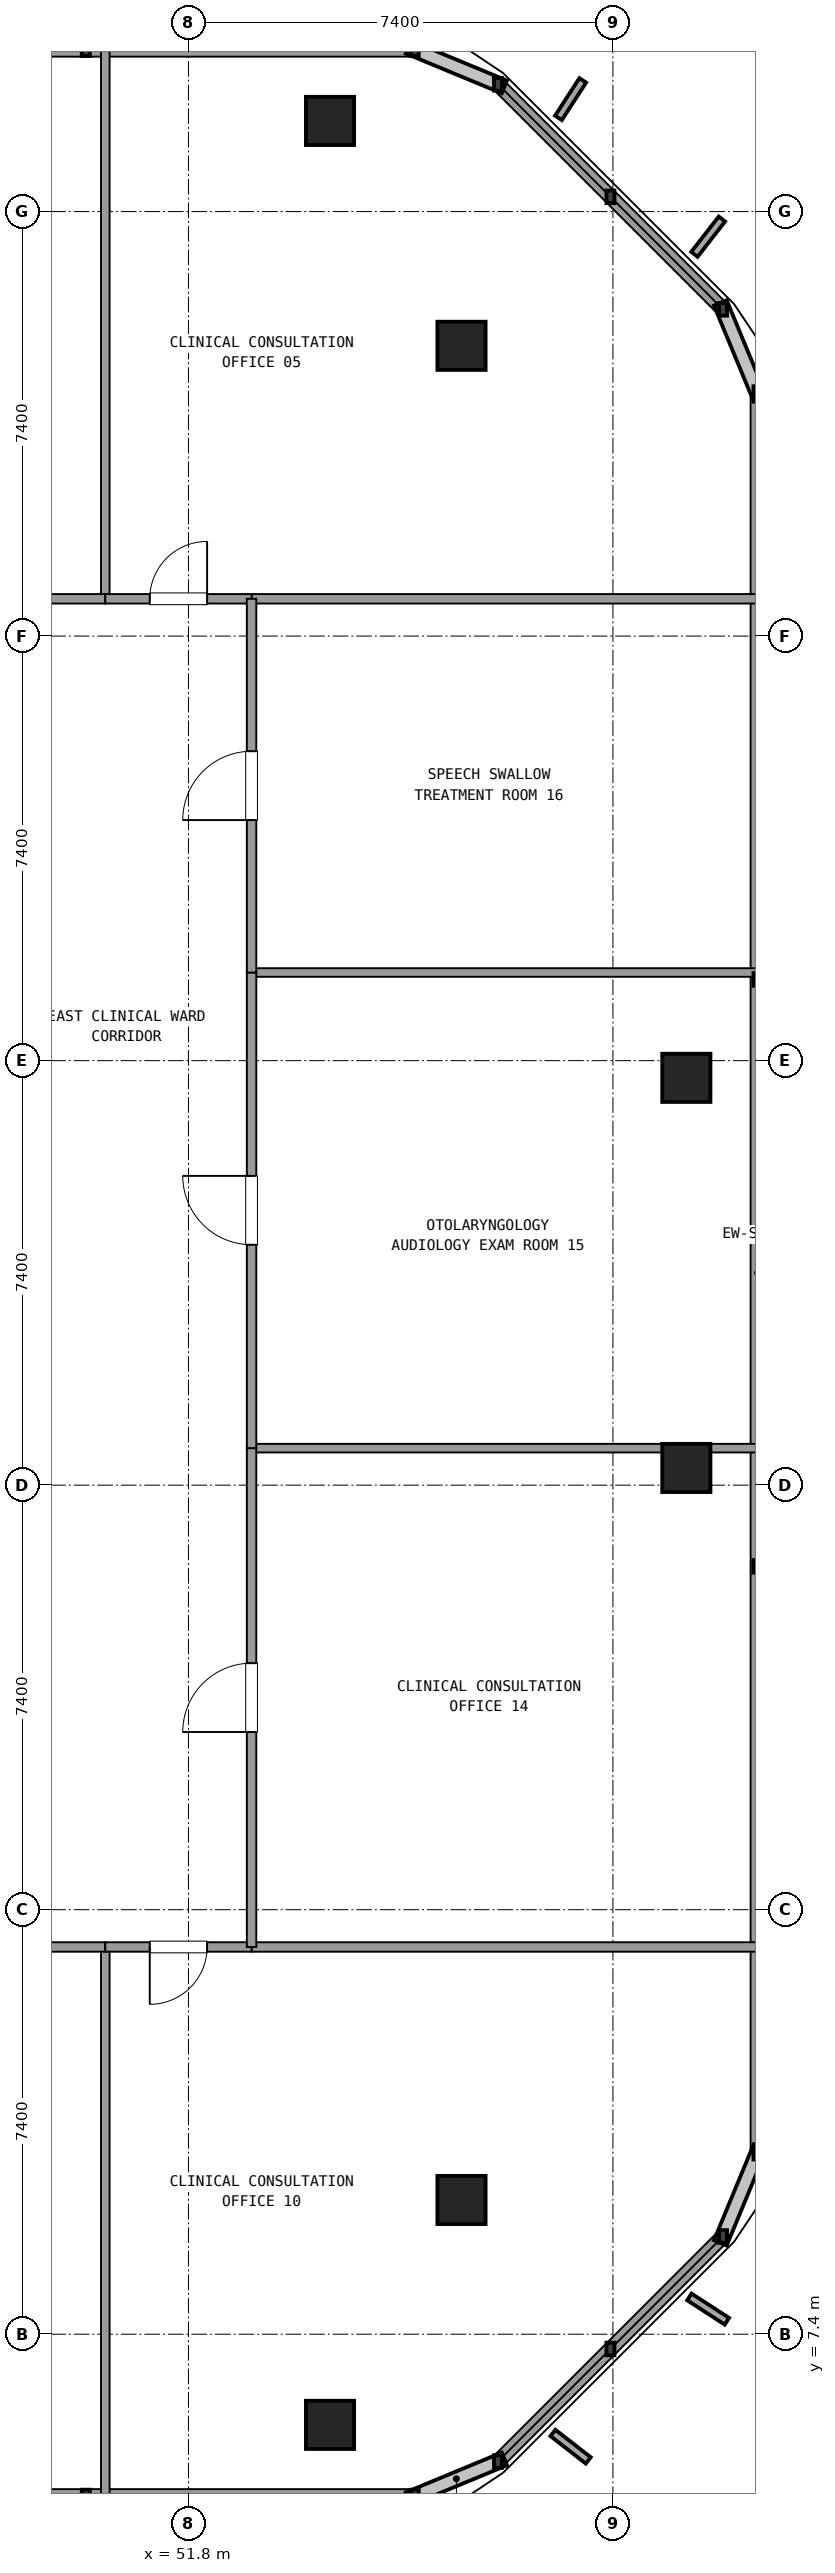
"""IFC4 building model, lengths in metres.
Left out: names, types, materials, properties, quantities, classifications, styles, units other than length and angle.
Written with IfcOpenShell. Run it as: python <this file> out.ifc"""

import sys

from ifc_helpers import new_model, si_unit, direction, frame, frame_2d, origin, origin_2d, place, context, subcontext, project, spatial, rectangle, extrude, element, fill, save


model = new_model("IFC4")
c1 = context("Model", 3, precision=1e-05, world=origin(), true_north=direction((0.0, 1.0)))
c2 = subcontext(c1, "Body", "Model", "MODEL_VIEW")
j1 = project(units=[si_unit("LENGTHUNIT", "METRE"), si_unit("PLANEANGLEUNIT", "RADIAN")], contexts=[c1])
p1 = place(None, origin())
s1 = spatial("IfcSite", under=j1, at=p1, CompositionType="ELEMENT")
p2 = place(p1, origin())
s2 = spatial("IfcBuilding", under=s1, at=p2, CompositionType="ELEMENT")
p3 = place(p2, frame((0.0, 0.0, 253.62)))
s3 = spatial("IfcBuildingStorey", under=s2, at=p3, CompositionType="ELEMENT", Elevation=253.62)
for number, where, z_axis, x_axis in (
    (1, (54.268, 5.82, 0.0), (0.0, 0.0, 1.0), (1.0, 0.0, 0.0)),
    (2, (56.56, 9.74, 0.0), (0.0, 0.0, 1.0), (1.0, 0.0, 0.0)),
    (3, (60.48, 22.5, 0.0), (0.0, 0.0, 1.0), (1.0, 0.0, 0.0)),
    (4, (60.48, 29.3, 0.0), (0.0, 0.0, 1.0), (1.0, 0.0, 0.0)),
    (5, (56.56, 42.06, 0.0), (0.0, 0.0, 1.0), (1.0, 0.0, 0.0)),
    (6, (54.268, 45.98, 0.0), (0.0, 0.0, 1.0), (1.0, 0.0, 0.0)),
):
    element("IfcColumn", number, at=place(p3, frame(where, z_axis=z_axis, x_axis=x_axis)), inside=s3, PredefinedType="COLUMN", context=c2, shape_type="SweptSolid", body=[
        extrude(rectangle(XDim=0.84, YDim=0.84, at=origin_2d()), origin(), (0.0, 0.0, 1.0), 3.6),
    ])
p4 = place(p3, frame((38.539, 4.58, 0.0), z_axis=(0.0, 0.0, 1.0), x_axis=(1.0, 0.0, 0.0)))
e7 = element("IfcWall", 7, at=p4, inside=s3, PredefinedType="SOLIDWALL", context=c2, shape_type="SweptSolid", body=[
    extrude(rectangle(XDim=17.206, YDim=0.24, at=frame_2d((8.603, 0.0))), origin(), (0.0, 0.0, 1.0), 0.85),
])
p5 = place(p3, frame((57.196, 5.181, 0.0), z_axis=(0.0, 0.0, 1.0), x_axis=(0.707084777957, 0.707128783731, 0.0)))
e8 = element("IfcWall", 8, at=p5, inside=s3, PredefinedType="SOLIDWALL", context=c2, shape_type="SweptSolid", body=[
    extrude(rectangle(XDim=5.548, YDim=0.24, at=frame_2d((2.774, 0.0))), origin(), (0.0, 0.0, 1.0), 0.85),
])
p6 = place(p3, frame((61.72, 10.555, 0.0), z_axis=(0.0, 0.0, 1.0), x_axis=(0.0, 1.0, 0.0)))
e9 = element("IfcWall", 9, at=p6, inside=s3, PredefinedType="SOLIDWALL", context=c2, shape_type="SweptSolid", body=[
    extrude(rectangle(XDim=30.69, YDim=0.24, at=frame_2d((15.345, 0.0))), origin(), (0.0, 0.0, 1.0), 0.85),
])
p7 = place(p3, frame((61.119, 42.696, 0.0), z_axis=(0.0, 0.0, 1.0), x_axis=(-0.707106781187, 0.707106781187, 0.0)))
e10 = element("IfcWall", 10, at=p7, inside=s3, PredefinedType="SOLIDWALL", context=c2, shape_type="SweptSolid", body=[
    extrude(rectangle(XDim=5.548, YDim=0.24, at=frame_2d((2.774, 0.0))), origin(), (0.0, 0.0, 1.0), 0.85),
])
p8 = place(p3, frame((55.745, 47.22, 0.0), z_axis=(0.0, 0.0, 1.0), x_axis=(-1.0, 0.0, 0.0)))
e11 = element("IfcWall", 11, at=p8, inside=s3, PredefinedType="SOLIDWALL", context=c2, shape_type="SweptSolid", body=[
    extrude(rectangle(XDim=17.204, YDim=0.24, at=frame_2d((8.602, 0.0))), origin(), (0.0, 0.0, 1.0), 0.85),
])
for number, where, z_axis, x_axis in (
    (12, (52.9, 37.65, 0.0), (0.0, 0.0, 1.0), (1.0, 0.0, 0.0)),
    (13, (52.9, 14.15, 0.0), (0.0, 0.0, 1.0), (1.0, 0.0, 0.0)),
):
    element("IfcWall", number, at=place(p3, frame(where, z_axis=z_axis, x_axis=x_axis)), inside=s3, PredefinedType="PARTITIONING", context=c2, shape_type="SweptSolid", body=[
        extrude(rectangle(XDim=8.8, YDim=0.165, at=frame_2d((4.4, 0.0))), origin(), (0.0, 0.0, 1.0), 2.61),
    ])
p9 = place(p3, frame((50.35, 37.65, 0.0), z_axis=(0.0, 0.0, 1.0), x_axis=(0.0, 1.0, 0.0)))
e14 = element("IfcWall", 14, at=p9, inside=s3, PredefinedType="PARTITIONING", context=c2, shape_type="SweptSolid", body=[
    extrude(rectangle(XDim=9.55, YDim=0.15, at=frame_2d((4.775, 0.0))), origin(), (0.0, 0.0, 1.0), 2.61),
])
p10 = place(p3, frame((42.194, 37.65, 0.0), z_axis=(0.0, 0.0, 1.0), x_axis=(1.0, 0.0, 0.0)))
e15 = element("IfcWall", 15, at=p10, inside=s3, PredefinedType="PARTITIONING", context=c2, shape_type="SweptSolid", body=[
    extrude(rectangle(XDim=8.156, YDim=0.165, at=frame_2d((4.078, 0.0))), origin(), (0.0, 0.0, 1.0), 2.61),
])
p11 = place(p10, frame((3.478, 0.0, 0.0)))
e16 = element("IfcOpeningElement", 16, at=p11, cuts=e15, PredefinedType="OPENING", context=c2, shape_type="SweptSolid", body=[
    extrude(rectangle(XDim=1.2, YDim=2.15, at=frame_2d((0.6, 1.075))), frame((0.0, 0.093, 0.0), z_axis=(0.0, -1.0, 0.0), x_axis=(1.0, 0.0, 0.0)), (0.0, 0.0, 1.0), 0.185),
])
p12 = place(p3, frame((50.35, 37.65, 0.0), z_axis=(0.0, 0.0, 1.0), x_axis=(1.0, 0.0, 0.0)))
e17 = element("IfcWall", 17, at=p12, inside=s3, PredefinedType="PARTITIONING", context=c2, shape_type="SweptSolid", body=[
    extrude(rectangle(XDim=2.55, YDim=0.165, at=frame_2d((1.275, 0.0))), origin(), (0.0, 0.0, 1.0), 2.61),
])
p13 = place(p12, frame((0.775, 0.0, 0.0)))
e18 = element("IfcOpeningElement", 18, at=p13, cuts=e17, PredefinedType="OPENING", context=c2, shape_type="SweptSolid", body=[
    extrude(rectangle(XDim=1.0, YDim=2.15, at=frame_2d((0.5, 1.075))), frame((0.0, 0.093, 0.0), z_axis=(0.0, -1.0, 0.0), x_axis=(1.0, 0.0, 0.0)), (0.0, 0.0, 1.0), 0.185),
])
p14 = place(p3, frame((50.35, 14.15, 0.0), z_axis=(0.0, 0.0, 1.0), x_axis=(0.0, -1.0, 0.0)))
e19 = element("IfcWall", 19, at=p14, inside=s3, PredefinedType="PARTITIONING", context=c2, shape_type="SweptSolid", body=[
    extrude(rectangle(XDim=9.55, YDim=0.15, at=frame_2d((4.775, 0.0))), origin(), (0.0, 0.0, 1.0), 2.61),
])
p15 = place(p3, frame((39.842, 14.15, 0.0), z_axis=(0.0, 0.0, 1.0), x_axis=(1.0, 0.0, 0.0)))
e20 = element("IfcWall", 20, at=p15, inside=s3, PredefinedType="PARTITIONING", context=c2, shape_type="SweptSolid", body=[
    extrude(rectangle(XDim=10.508, YDim=0.165, at=frame_2d((5.254, 0.0))), origin(), (0.0, 0.0, 1.0), 2.61),
])
p16 = place(p15, frame((4.654, 0.0, 0.0)))
e21 = element("IfcOpeningElement", 21, at=p16, cuts=e20, PredefinedType="OPENING", context=c2, shape_type="SweptSolid", body=[
    extrude(rectangle(XDim=1.2, YDim=2.15, at=frame_2d((0.6, 1.075))), frame((0.0, 0.093, 0.0), z_axis=(0.0, -1.0, 0.0), x_axis=(1.0, 0.0, 0.0)), (0.0, 0.0, 1.0), 0.185),
])
p17 = place(p3, frame((50.35, 14.15, 0.0), z_axis=(0.0, 0.0, 1.0), x_axis=(1.0, 0.0, 0.0)))
e22 = element("IfcWall", 22, at=p17, inside=s3, PredefinedType="PARTITIONING", context=c2, shape_type="SweptSolid", body=[
    extrude(rectangle(XDim=2.55, YDim=0.165, at=frame_2d((1.275, 0.0))), origin(), (0.0, 0.0, 1.0), 2.61),
])
p18 = place(p17, frame((0.775, 0.0, 0.0)))
e23 = element("IfcOpeningElement", 23, at=p18, cuts=e22, PredefinedType="OPENING", context=c2, shape_type="SweptSolid", body=[
    extrude(rectangle(XDim=1.0, YDim=2.15, at=frame_2d((0.5, 1.075))), frame((0.0, 0.093, 0.0), z_axis=(0.0, -1.0, 0.0), x_axis=(1.0, 0.0, 0.0)), (0.0, 0.0, 1.0), 0.185),
])
p19 = place(p3, frame((52.9, 22.845, 0.0), z_axis=(0.0, 0.0, 1.0), x_axis=(1.0, 0.0, 0.0)))
e24 = element("IfcWall", 24, at=p19, inside=s3, PredefinedType="PARTITIONING", context=c2, shape_type="SweptSolid", body=[
    extrude(rectangle(XDim=8.8, YDim=0.15, at=frame_2d((4.4, 0.0))), origin(), (0.0, 0.0, 1.0), 2.61),
])
p20 = place(p3, frame((52.9, 14.15, 0.0), z_axis=(0.0, 0.0, 1.0), x_axis=(0.0, 1.0, 0.0)))
e25 = element("IfcWall", 25, at=p20, inside=s3, PredefinedType="PARTITIONING", context=c2, shape_type="SweptSolid", body=[
    extrude(rectangle(XDim=8.695, YDim=0.165, at=frame_2d((4.348, 0.0))), origin(), (0.0, 0.0, 1.0), 2.61),
])
p21 = place(p20, frame((3.747, 0.0, 0.0)))
e26 = element("IfcOpeningElement", 26, at=p21, cuts=e25, PredefinedType="OPENING", context=c2, shape_type="SweptSolid", body=[
    extrude(rectangle(XDim=1.2, YDim=2.15, at=frame_2d((0.6, 1.075))), frame((0.0, 0.093, 0.0), z_axis=(0.0, -1.0, 0.0), x_axis=(1.0, 0.0, 0.0)), (0.0, 0.0, 1.0), 0.185),
])
p22 = place(p3, frame((52.9, 31.136, 0.0), z_axis=(0.0, 0.0, 1.0), x_axis=(1.0, 0.0, 0.0)))
e27 = element("IfcWall", 27, at=p22, inside=s3, PredefinedType="PARTITIONING", context=c2, shape_type="SweptSolid", body=[
    extrude(rectangle(XDim=8.8, YDim=0.15, at=frame_2d((4.4, 0.0))), origin(), (0.0, 0.0, 1.0), 2.61),
])
p23 = place(p3, frame((52.9, 22.845, 0.0), z_axis=(0.0, 0.0, 1.0), x_axis=(0.0, 1.0, 0.0)))
e28 = element("IfcWall", 28, at=p23, inside=s3, PredefinedType="PARTITIONING", context=c2, shape_type="SweptSolid", body=[
    extrude(rectangle(XDim=8.291, YDim=0.165, at=frame_2d((4.146, 0.0))), origin(), (0.0, 0.0, 1.0), 2.61),
])
p24 = place(p23, frame((3.546, 0.0, 0.0)))
e29 = element("IfcOpeningElement", 29, at=p24, cuts=e28, PredefinedType="OPENING", context=c2, shape_type="SweptSolid", body=[
    extrude(rectangle(XDim=1.2, YDim=2.15, at=frame_2d((0.6, 1.075))), frame((0.0, 0.093, 0.0), z_axis=(0.0, -1.0, 0.0), x_axis=(1.0, 0.0, 0.0)), (0.0, 0.0, 1.0), 0.185),
])
p25 = place(p3, frame((52.9, 31.136, 0.0), z_axis=(0.0, 0.0, 1.0), x_axis=(0.0, 1.0, 0.0)))
e30 = element("IfcWall", 30, at=p25, inside=s3, PredefinedType="PARTITIONING", context=c2, shape_type="SweptSolid", body=[
    extrude(rectangle(XDim=6.514, YDim=0.165, at=frame_2d((3.257, 0.0))), origin(), (0.0, 0.0, 1.0), 2.61),
])
p26 = place(p25, frame((2.657, 0.0, 0.0)))
e31 = element("IfcOpeningElement", 31, at=p26, cuts=e30, PredefinedType="OPENING", context=c2, shape_type="SweptSolid", body=[
    extrude(rectangle(XDim=1.2, YDim=2.15, at=frame_2d((0.6, 1.075))), frame((0.0, 0.093, 0.0), z_axis=(0.0, -1.0, 0.0), x_axis=(1.0, 0.0, 0.0)), (0.0, 0.0, 1.0), 0.185),
])
p27 = place(p13, origin())
e32 = element("IfcDoor", 32, at=p27, inside=s3, OperationType="SINGLE_SWING_RIGHT", PredefinedType="DOOR", context=c2, shape_type="SweptSolid", body=[
    extrude(rectangle(XDim=1.0, YDim=2.15, at=frame_2d((0.5, 1.075))), frame((0.0, 0.025, 0.0), z_axis=(0.0, -1.0, 0.0), x_axis=(1.0, 0.0, 0.0)), (0.0, 0.0, 1.0), 0.05),
])
fill(e18, e32)
p28 = place(p18, frame((1.0, 0.0, 0.0), z_axis=(0.0, 0.0, 1.0), x_axis=(-1.0, 0.0, 0.0)))
e33 = element("IfcDoor", 33, at=p28, inside=s3, OperationType="SINGLE_SWING_LEFT", PredefinedType="DOOR", context=c2, shape_type="SweptSolid", body=[
    extrude(rectangle(XDim=1.0, YDim=2.15, at=frame_2d((0.5, 1.075))), frame((0.0, 0.025, 0.0), z_axis=(0.0, -1.0, 0.0), x_axis=(1.0, 0.0, 0.0)), (0.0, 0.0, 1.0), 0.05),
])
fill(e23, e33)
p29 = place(p21, origin())
e34 = element("IfcDoor", 34, at=p29, inside=s3, OperationType="SINGLE_SWING_LEFT", PredefinedType="DOOR", context=c2, shape_type="SweptSolid", body=[
    extrude(rectangle(XDim=1.2, YDim=2.15, at=frame_2d((0.6, 1.075))), frame((0.0, 0.025, 0.0), z_axis=(0.0, -1.0, 0.0), x_axis=(1.0, 0.0, 0.0)), (0.0, 0.0, 1.0), 0.05),
])
fill(e26, e34)
p30 = place(p24, origin())
e35 = element("IfcDoor", 35, at=p30, inside=s3, OperationType="SINGLE_SWING_RIGHT", PredefinedType="DOOR", context=c2, shape_type="SweptSolid", body=[
    extrude(rectangle(XDim=1.2, YDim=2.15, at=frame_2d((0.6, 1.075))), frame((0.0, 0.025, 0.0), z_axis=(0.0, -1.0, 0.0), x_axis=(1.0, 0.0, 0.0)), (0.0, 0.0, 1.0), 0.05),
])
fill(e29, e35)
p31 = place(p26, origin())
e36 = element("IfcDoor", 36, at=p31, inside=s3, OperationType="SINGLE_SWING_LEFT", PredefinedType="DOOR", context=c2, shape_type="SweptSolid", body=[
    extrude(rectangle(XDim=1.2, YDim=2.15, at=frame_2d((0.6, 1.075))), frame((0.0, 0.025, 0.0), z_axis=(0.0, -1.0, 0.0), x_axis=(1.0, 0.0, 0.0)), (0.0, 0.0, 1.0), 0.05),
])
fill(e31, e36)
save(model, sys.argv[1])
